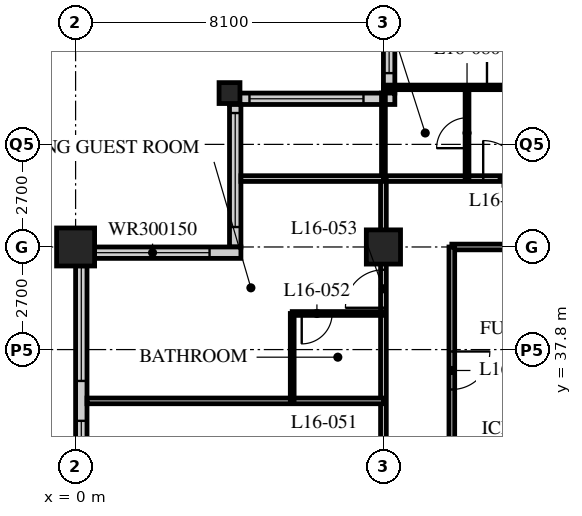
"""IFC4 building model, lengths in metres.
Left out: names, types, materials, properties, quantities, classifications, styles, units other than length and angle.
Written with IfcOpenShell. Run it as: python <this file> out.ifc"""

import sys

from ifc_helpers import new_model, si_unit, direction, frame, frame_2d, origin, origin_2d, place, context, subcontext, project, spatial, rectangle, hollow_rectangle, extrude, element, fill, save


model = new_model("IFC4")
c1 = context("Model", 3, precision=1e-05, world=origin(), true_north=direction((0.0, 1.0)))
c2 = subcontext(c1, "Body", "Model", "MODEL_VIEW")
j1 = project(units=[si_unit("LENGTHUNIT", "METRE"), si_unit("PLANEANGLEUNIT", "RADIAN")], contexts=[c1])
p1 = place(None, origin())
s1 = spatial("IfcSite", under=j1, at=p1, CompositionType="ELEMENT")
p2 = place(p1, origin())
s2 = spatial("IfcBuilding", under=s1, at=p2, CompositionType="ELEMENT")
p3 = place(p2, frame((0.0, 0.0, 67.0)))
s3 = spatial("IfcBuildingStorey", under=s2, at=p3, CompositionType="ELEMENT", Elevation=67.0)
p4 = place(p3, frame((0.0, 40.5, 0.0), z_axis=(0.0, 0.0, 1.0), x_axis=(1.0, 0.0, 0.0)))
e1 = element("IfcColumn", 1, at=p4, inside=s3, PredefinedType="COLUMN", context=c2, shape_type="SweptSolid", body=[
    extrude(hollow_rectangle(XDim=1.0, YDim=1.0, WallThickness=0.1, at=origin_2d()), origin(), (0.0, 0.0, 1.0), 3.4),
])
p5 = place(p3, frame((4.05, 44.55, 0.0), z_axis=(0.0, 0.0, 1.0), x_axis=(1.0, 0.0, 0.0)))
e2 = element("IfcColumn", 2, at=p5, inside=s3, PredefinedType="COLUMN", context=c2, shape_type="SweptSolid", body=[
    extrude(hollow_rectangle(XDim=0.55, YDim=0.55, WallThickness=0.05, at=origin_2d()), origin(), (0.0, 0.0, 1.0), 3.4),
])
p6 = place(p3, frame((8.1, 40.5, 0.0), z_axis=(0.0, 0.0, 1.0), x_axis=(1.0, 0.0, 0.0)))
e3 = element("IfcColumn", 3, at=p6, inside=s3, PredefinedType="COLUMN", context=c2, shape_type="SweptSolid", body=[
    extrude(hollow_rectangle(XDim=0.9, YDim=0.9, WallThickness=0.09, at=origin_2d()), origin(), (0.0, 0.0, 1.0), 3.4),
])
p7 = place(p3, frame((8.25, 48.3, 0.0), z_axis=(0.0, 0.0, 1.0), x_axis=(0.0, -1.0, 0.0)))
e4 = element("IfcWall", 4, at=p7, inside=s3, PredefinedType="SOLIDWALL", context=c2, shape_type="SweptSolid", body=[
    extrude(rectangle(XDim=3.75, YDim=0.3, at=frame_2d((1.875, 0.0))), origin(), (0.0, 0.0, 1.0), 3.19),
])
p8 = place(p7, frame((0.225, 0.0, 0.9)))
e5 = element("IfcOpeningElement", 5, at=p8, cuts=e4, PredefinedType="OPENING", context=c2, shape_type="SweptSolid", body=[
    extrude(rectangle(XDim=3.0, YDim=1.5, at=frame_2d((1.5, 0.75))), frame((0.0, 0.16, 0.0), z_axis=(0.0, -1.0, 0.0), x_axis=(1.0, 0.0, 0.0)), (0.0, 0.0, 1.0), 0.32),
])
p9 = place(p3, frame((8.4, 44.4, 0.0), z_axis=(0.0, 0.0, 1.0), x_axis=(-1.0, 0.0, 0.0)))
e6 = element("IfcWall", 6, at=p9, inside=s3, PredefinedType="SOLIDWALL", context=c2, shape_type="SweptSolid", body=[
    extrude(rectangle(XDim=4.35, YDim=0.3, at=frame_2d((2.175, 0.0))), origin(), (0.0, 0.0, 1.0), 3.19),
])
p10 = place(p9, frame((0.825, 0.0, 0.9)))
e7 = element("IfcOpeningElement", 7, at=p10, cuts=e6, PredefinedType="OPENING", context=c2, shape_type="SweptSolid", body=[
    extrude(rectangle(XDim=3.0, YDim=1.5, at=frame_2d((1.5, 0.75))), frame((0.0, 0.16, 0.0), z_axis=(0.0, -1.0, 0.0), x_axis=(1.0, 0.0, 0.0)), (0.0, 0.0, 1.0), 0.32),
])
p11 = place(p3, frame((4.2, 44.25, 0.0), z_axis=(0.0, 0.0, 1.0), x_axis=(0.0, -1.0, 0.0)))
e8 = element("IfcWall", 8, at=p11, inside=s3, PredefinedType="SOLIDWALL", context=c2, shape_type="SweptSolid", body=[
    extrude(rectangle(XDim=3.75, YDim=0.3, at=frame_2d((1.875, 0.0))), origin(), (0.0, 0.0, 1.0), 3.19),
])
p12 = place(p11, frame((0.225, 0.0, 0.9)))
e9 = element("IfcOpeningElement", 9, at=p12, cuts=e8, PredefinedType="OPENING", context=c2, shape_type="SweptSolid", body=[
    extrude(rectangle(XDim=3.0, YDim=1.5, at=frame_2d((1.5, 0.75))), frame((0.0, 0.16, 0.0), z_axis=(0.0, -1.0, 0.0), x_axis=(1.0, 0.0, 0.0)), (0.0, 0.0, 1.0), 0.32),
])
p13 = place(p3, frame((4.35, 40.35, 0.0), z_axis=(0.0, 0.0, 1.0), x_axis=(-1.0, 0.0, 0.0)))
e10 = element("IfcWall", 10, at=p13, inside=s3, PredefinedType="SOLIDWALL", context=c2, shape_type="SweptSolid", body=[
    extrude(rectangle(XDim=4.35, YDim=0.3, at=frame_2d((2.175, 0.0))), origin(), (0.0, 0.0, 1.0), 3.19),
])
p14 = place(p13, frame((0.825, 0.0, 0.9)))
e11 = element("IfcOpeningElement", 11, at=p14, cuts=e10, PredefinedType="OPENING", context=c2, shape_type="SweptSolid", body=[
    extrude(rectangle(XDim=3.0, YDim=1.5, at=frame_2d((1.5, 0.75))), frame((0.0, 0.16, 0.0), z_axis=(0.0, -1.0, 0.0), x_axis=(1.0, 0.0, 0.0)), (0.0, 0.0, 1.0), 0.32),
])
p15 = place(p3, frame((0.15, 40.2, 0.0), z_axis=(0.0, 0.0, 1.0), x_axis=(0.0, -1.0, 0.0)))
e12 = element("IfcWall", 12, at=p15, inside=s3, PredefinedType="SOLIDWALL", context=c2, shape_type="SweptSolid", body=[
    extrude(rectangle(XDim=32.1, YDim=0.3, at=frame_2d((16.05, 0.0))), origin(), (0.0, 0.0, 1.0), 3.19),
])
p16 = place(p15, frame((0.225, 0.0, 0.9)))
e13 = element("IfcOpeningElement", 13, at=p16, cuts=e12, PredefinedType="OPENING", context=c2, shape_type="SweptSolid", body=[
    extrude(rectangle(XDim=3.0, YDim=2.0, at=frame_2d((1.5, 1.0))), frame((0.0, 0.16, 0.0), z_axis=(0.0, -1.0, 0.0), x_axis=(1.0, 0.0, 0.0)), (0.0, 0.0, 1.0), 0.32),
])
p17 = place(p15, frame((4.275, 0.0, 0.9)))
e14 = element("IfcOpeningElement", 14, at=p17, cuts=e12, PredefinedType="OPENING", context=c2, shape_type="SweptSolid", body=[
    extrude(rectangle(XDim=3.0, YDim=2.0, at=frame_2d((1.5, 1.0))), frame((0.0, 0.16, 0.0), z_axis=(0.0, -1.0, 0.0), x_axis=(1.0, 0.0, 0.0)), (0.0, 0.0, 1.0), 0.32),
])
p18 = place(p15, frame((8.325, 0.0, 0.9)))
e15 = element("IfcOpeningElement", 15, at=p18, cuts=e12, PredefinedType="OPENING", context=c2, shape_type="SweptSolid", body=[
    extrude(rectangle(XDim=3.0, YDim=2.0, at=frame_2d((1.5, 1.0))), frame((0.0, 0.16, 0.0), z_axis=(0.0, -1.0, 0.0), x_axis=(1.0, 0.0, 0.0)), (0.0, 0.0, 1.0), 0.32),
])
p19 = place(p15, frame((12.375, 0.0, 0.9)))
e16 = element("IfcOpeningElement", 16, at=p19, cuts=e12, PredefinedType="OPENING", context=c2, shape_type="SweptSolid", body=[
    extrude(rectangle(XDim=3.0, YDim=2.0, at=frame_2d((1.5, 1.0))), frame((0.0, 0.16, 0.0), z_axis=(0.0, -1.0, 0.0), x_axis=(1.0, 0.0, 0.0)), (0.0, 0.0, 1.0), 0.32),
])
p20 = place(p15, frame((16.425, 0.0, 0.9)))
e17 = element("IfcOpeningElement", 17, at=p20, cuts=e12, PredefinedType="OPENING", context=c2, shape_type="SweptSolid", body=[
    extrude(rectangle(XDim=3.0, YDim=2.0, at=frame_2d((1.5, 1.0))), frame((0.0, 0.16, 0.0), z_axis=(0.0, -1.0, 0.0), x_axis=(1.0, 0.0, 0.0)), (0.0, 0.0, 1.0), 0.32),
])
p21 = place(p15, frame((20.475, 0.0, 0.9)))
e18 = element("IfcOpeningElement", 18, at=p21, cuts=e12, PredefinedType="OPENING", context=c2, shape_type="SweptSolid", body=[
    extrude(rectangle(XDim=3.0, YDim=2.0, at=frame_2d((1.5, 1.0))), frame((0.0, 0.16, 0.0), z_axis=(0.0, -1.0, 0.0), x_axis=(1.0, 0.0, 0.0)), (0.0, 0.0, 1.0), 0.32),
])
p22 = place(p15, frame((24.525, 0.0, 0.9)))
e19 = element("IfcOpeningElement", 19, at=p22, cuts=e12, PredefinedType="OPENING", context=c2, shape_type="SweptSolid", body=[
    extrude(rectangle(XDim=3.0, YDim=2.0, at=frame_2d((1.5, 1.0))), frame((0.0, 0.16, 0.0), z_axis=(0.0, -1.0, 0.0), x_axis=(1.0, 0.0, 0.0)), (0.0, 0.0, 1.0), 0.32),
])
p23 = place(p15, frame((28.575, 0.0, 0.9)))
e20 = element("IfcOpeningElement", 20, at=p23, cuts=e12, PredefinedType="OPENING", context=c2, shape_type="SweptSolid", body=[
    extrude(rectangle(XDim=3.0, YDim=2.0, at=frame_2d((1.5, 1.0))), frame((0.0, 0.16, 0.0), z_axis=(0.0, -1.0, 0.0), x_axis=(1.0, 0.0, 0.0)), (0.0, 0.0, 1.0), 0.32),
])
p24 = place(p3, frame((8.1, 42.3, 0.0), z_axis=(0.0, 0.0, 1.0), x_axis=(1.0, 0.0, 0.0)))
e21 = element("IfcWall", 21, at=p24, inside=s3, PredefinedType="PARTITIONING", context=c2, shape_type="SweptSolid", body=[
    extrude(rectangle(XDim=36.45, YDim=0.15, at=frame_2d((18.225, 0.0))), origin(), (0.0, 0.0, 1.0), 3.19),
])
p25 = place(p24, frame((9.5, 0.0, 0.0)))
e22 = element("IfcOpeningElement", 22, at=p25, cuts=e21, PredefinedType="OPENING", context=c2, shape_type="SweptSolid", body=[
    extrude(rectangle(XDim=1.0, YDim=2.1, at=frame_2d((0.5, 1.05))), frame((0.0, 0.085, 0.0), z_axis=(0.0, -1.0, 0.0), x_axis=(1.0, 0.0, 0.0)), (0.0, 0.0, 1.0), 0.17),
])
p26 = place(p24, frame((14.6, 0.0, 0.0)))
e23 = element("IfcOpeningElement", 23, at=p26, cuts=e21, PredefinedType="OPENING", context=c2, shape_type="SweptSolid", body=[
    extrude(rectangle(XDim=1.0, YDim=2.1, at=frame_2d((0.5, 1.05))), frame((0.0, 0.085, 0.0), z_axis=(0.0, -1.0, 0.0), x_axis=(1.0, 0.0, 0.0)), (0.0, 0.0, 1.0), 0.17),
])
p27 = place(p24, frame((18.65, 0.0, 0.0)))
e24 = element("IfcOpeningElement", 24, at=p27, cuts=e21, PredefinedType="OPENING", context=c2, shape_type="SweptSolid", body=[
    extrude(rectangle(XDim=1.0, YDim=2.1, at=frame_2d((0.5, 1.05))), frame((0.0, 0.085, 0.0), z_axis=(0.0, -1.0, 0.0), x_axis=(1.0, 0.0, 0.0)), (0.0, 0.0, 1.0), 0.17),
])
p28 = place(p24, frame((25.7, 0.0, 0.0)))
e25 = element("IfcOpeningElement", 25, at=p28, cuts=e21, PredefinedType="OPENING", context=c2, shape_type="SweptSolid", body=[
    extrude(rectangle(XDim=1.0, YDim=2.1, at=frame_2d((0.5, 1.05))), frame((0.0, 0.085, 0.0), z_axis=(0.0, -1.0, 0.0), x_axis=(1.0, 0.0, 0.0)), (0.0, 0.0, 1.0), 0.17),
])
p29 = place(p24, frame((30.8, 0.0, 0.0)))
e26 = element("IfcOpeningElement", 26, at=p29, cuts=e21, PredefinedType="OPENING", context=c2, shape_type="SweptSolid", body=[
    extrude(rectangle(XDim=1.0, YDim=2.1, at=frame_2d((0.5, 1.05))), frame((0.0, 0.085, 0.0), z_axis=(0.0, -1.0, 0.0), x_axis=(1.0, 0.0, 0.0)), (0.0, 0.0, 1.0), 0.17),
])
p30 = place(p24, frame((32.825, 0.0, 0.0)))
e27 = element("IfcOpeningElement", 27, at=p30, cuts=e21, PredefinedType="OPENING", context=c2, shape_type="SweptSolid", body=[
    extrude(rectangle(XDim=1.0, YDim=2.1, at=frame_2d((0.5, 1.05))), frame((0.0, 0.085, 0.0), z_axis=(0.0, -1.0, 0.0), x_axis=(1.0, 0.0, 0.0)), (0.0, 0.0, 1.0), 0.17),
])
p31 = place(p24, frame((2.625, 0.0, 0.0)))
e28 = element("IfcOpeningElement", 28, at=p31, cuts=e21, PredefinedType="OPENING", context=c2, shape_type="SweptSolid", body=[
    extrude(rectangle(XDim=1.0, YDim=2.1, at=frame_2d((0.5, 1.05))), frame((0.0, 0.085, 0.0), z_axis=(0.0, -1.0, 0.0), x_axis=(1.0, 0.0, 0.0)), (0.0, 0.0, 1.0), 0.17),
])
p32 = place(p3, frame((8.1, 12.15, 0.0), z_axis=(0.0, 0.0, 1.0), x_axis=(0.0, 1.0, 0.0)))
e29 = element("IfcWall", 29, at=p32, inside=s3, PredefinedType="PARTITIONING", context=c2, shape_type="SweptSolid", body=[
    extrude(rectangle(XDim=30.15, YDim=0.15, at=frame_2d((15.075, 0.0))), origin(), (0.0, 0.0, 1.0), 2.578),
])
p33 = place(p32, frame((0.6, 0.0, 0.0)))
e30 = element("IfcOpeningElement", 30, at=p33, cuts=e29, PredefinedType="OPENING", context=c2, shape_type="SweptSolid", body=[
    extrude(rectangle(XDim=1.0, YDim=2.1, at=frame_2d((0.5, 1.05))), frame((0.0, 0.085, 0.0), z_axis=(0.0, -1.0, 0.0), x_axis=(1.0, 0.0, 0.0)), (0.0, 0.0, 1.0), 0.17),
])
p34 = place(p32, frame((6.8, 0.0, 0.0)))
e31 = element("IfcOpeningElement", 31, at=p34, cuts=e29, PredefinedType="OPENING", context=c2, shape_type="SweptSolid", body=[
    extrude(rectangle(XDim=1.0, YDim=2.1, at=frame_2d((0.5, 1.05))), frame((0.0, 0.085, 0.0), z_axis=(0.0, -1.0, 0.0), x_axis=(1.0, 0.0, 0.0)), (0.0, 0.0, 1.0), 0.17),
])
p35 = place(p32, frame((8.7, 0.0, 0.0)))
e32 = element("IfcOpeningElement", 32, at=p35, cuts=e29, PredefinedType="OPENING", context=c2, shape_type="SweptSolid", body=[
    extrude(rectangle(XDim=1.0, YDim=2.1, at=frame_2d((0.5, 1.05))), frame((0.0, 0.085, 0.0), z_axis=(0.0, -1.0, 0.0), x_axis=(1.0, 0.0, 0.0)), (0.0, 0.0, 1.0), 0.17),
])
p36 = place(p32, frame((14.6, 0.0, 0.0)))
e33 = element("IfcOpeningElement", 33, at=p36, cuts=e29, PredefinedType="OPENING", context=c2, shape_type="SweptSolid", body=[
    extrude(rectangle(XDim=1.0, YDim=2.1, at=frame_2d((0.5, 1.05))), frame((0.0, 0.085, 0.0), z_axis=(0.0, -1.0, 0.0), x_axis=(1.0, 0.0, 0.0)), (0.0, 0.0, 1.0), 0.17),
])
p37 = place(p32, frame((21.65, 0.0, 0.0)))
e34 = element("IfcOpeningElement", 34, at=p37, cuts=e29, PredefinedType="OPENING", context=c2, shape_type="SweptSolid", body=[
    extrude(rectangle(XDim=1.0, YDim=2.1, at=frame_2d((0.5, 1.05))), frame((0.0, 0.085, 0.0), z_axis=(0.0, -1.0, 0.0), x_axis=(1.0, 0.0, 0.0)), (0.0, 0.0, 1.0), 0.17),
])
p38 = place(p32, frame((26.75, 0.0, 0.0)))
e35 = element("IfcOpeningElement", 35, at=p38, cuts=e29, PredefinedType="OPENING", context=c2, shape_type="SweptSolid", body=[
    extrude(rectangle(XDim=1.0, YDim=2.1, at=frame_2d((0.5, 1.05))), frame((0.0, 0.085, 0.0), z_axis=(0.0, -1.0, 0.0), x_axis=(1.0, 0.0, 0.0)), (0.0, 0.0, 1.0), 0.17),
])
p39 = place(p3, frame((16.0, 40.5, 0.0), z_axis=(0.0, 0.0, 1.0), x_axis=(-1.0, 0.0, 0.0)))
e36 = element("IfcWall", 36, at=p39, inside=s3, PredefinedType="PARTITIONING", context=c2, shape_type="SweptSolid", body=[
    extrude(rectangle(XDim=6.1, YDim=0.15, at=frame_2d((3.05, 0.0))), origin(), (0.0, 0.0, 1.0), 2.578),
])
p40 = place(p3, frame((9.9, 40.5, 0.0), z_axis=(0.0, 0.0, 1.0), x_axis=(0.0, -1.0, 0.0)))
e37 = element("IfcWall", 37, at=p40, inside=s3, PredefinedType="PARTITIONING", context=c2, shape_type="SweptSolid", body=[
    extrude(rectangle(XDim=26.55, YDim=0.15, at=frame_2d((13.275, 0.0))), origin(), (0.0, 0.0, 1.0), 3.19),
])
p41 = place(p40, frame((14.271, 0.0, 0.0)))
e38 = element("IfcOpeningElement", 38, at=p41, cuts=e37, PredefinedType="OPENING", context=c2, shape_type="SweptSolid", body=[
    extrude(rectangle(XDim=1.0, YDim=2.1, at=frame_2d((0.5, 1.05))), frame((0.0, 0.085, 0.0), z_axis=(0.0, -1.0, 0.0), x_axis=(1.0, 0.0, 0.0)), (0.0, 0.0, 1.0), 0.17),
])
p42 = place(p40, frame((10.221, 0.0, 0.0)))
e39 = element("IfcOpeningElement", 39, at=p42, cuts=e37, PredefinedType="OPENING", context=c2, shape_type="SweptSolid", body=[
    extrude(rectangle(XDim=1.0, YDim=2.1, at=frame_2d((0.5, 1.05))), frame((0.0, 0.085, 0.0), z_axis=(0.0, -1.0, 0.0), x_axis=(1.0, 0.0, 0.0)), (0.0, 0.0, 1.0), 0.17),
])
p43 = place(p40, frame((6.8, 0.0, 0.0)))
e40 = element("IfcOpeningElement", 40, at=p43, cuts=e37, PredefinedType="OPENING", context=c2, shape_type="SweptSolid", body=[
    extrude(rectangle(XDim=1.0, YDim=2.1, at=frame_2d((0.5, 1.05))), frame((0.0, 0.085, 0.0), z_axis=(0.0, -1.0, 0.0), x_axis=(1.0, 0.0, 0.0)), (0.0, 0.0, 1.0), 0.17),
])
p44 = place(p40, frame((2.75, 0.0, 0.0)))
e41 = element("IfcOpeningElement", 41, at=p44, cuts=e37, PredefinedType="OPENING", context=c2, shape_type="SweptSolid", body=[
    extrude(rectangle(XDim=1.0, YDim=2.1, at=frame_2d((0.5, 1.05))), frame((0.0, 0.085, 0.0), z_axis=(0.0, -1.0, 0.0), x_axis=(1.0, 0.0, 0.0)), (0.0, 0.0, 1.0), 0.17),
])
p45 = place(p3, frame((8.1, 36.45, 0.0), z_axis=(0.0, 0.0, 1.0), x_axis=(-1.0, 0.0, 0.0)))
e42 = element("IfcWall", 42, at=p45, inside=s3, PredefinedType="PARTITIONING", context=c2, shape_type="SweptSolid", body=[
    extrude(rectangle(XDim=7.8, YDim=0.15, at=frame_2d((3.9, 0.0))), origin(), (0.0, 0.0, 1.0), 3.19),
])
p46 = place(p3, frame((5.7, 36.45, 0.0), z_axis=(0.0, 0.0, 1.0), x_axis=(0.0, 1.0, 0.0)))
e43 = element("IfcWall", 43, at=p46, inside=s3, PredefinedType="PARTITIONING", context=c2, shape_type="SweptSolid", body=[
    extrude(rectangle(XDim=2.3, YDim=0.1, at=frame_2d((1.15, 0.0))), origin(), (0.0, 0.0, 1.0), 3.19),
])
p47 = place(p3, frame((8.1, 38.75, 0.0), z_axis=(0.0, 0.0, 1.0), x_axis=(-1.0, 0.0, 0.0)))
e44 = element("IfcWall", 44, at=p47, inside=s3, PredefinedType="PARTITIONING", context=c2, shape_type="SweptSolid", body=[
    extrude(rectangle(XDim=2.4, YDim=0.1, at=frame_2d((1.2, 0.0))), origin(), (0.0, 0.0, 1.0), 3.19),
])
p48 = place(p47, frame((1.35, 0.0, 0.0)))
e45 = element("IfcOpeningElement", 45, at=p48, cuts=e44, PredefinedType="OPENING", context=c2, shape_type="SweptSolid", body=[
    extrude(rectangle(XDim=0.8, YDim=2.1, at=frame_2d((0.4, 1.05))), frame((0.0, 0.06, 0.0), z_axis=(0.0, -1.0, 0.0), x_axis=(1.0, 0.0, 0.0)), (0.0, 0.0, 1.0), 0.12),
])
p49 = place(p3, frame((8.1, 44.7, 0.0), z_axis=(0.0, 0.0, 1.0), x_axis=(1.0, 0.0, 0.0)))
e46 = element("IfcWall", 46, at=p49, inside=s3, PredefinedType="PARTITIONING", context=c2, shape_type="SweptSolid", body=[
    extrude(rectangle(XDim=4.05, YDim=0.12, at=frame_2d((2.025, 0.0))), origin(), (0.0, 0.0, 1.0), 3.19),
])
p50 = place(p49, frame((2.725, 0.0, 0.0)))
e47 = element("IfcOpeningElement", 47, at=p50, cuts=e46, PredefinedType="OPENING", context=c2, shape_type="SweptSolid", body=[
    extrude(rectangle(XDim=0.85, YDim=2.1, at=frame_2d((0.425, 1.05))), frame((0.0, 0.07, 0.0), z_axis=(0.0, -1.0, 0.0), x_axis=(1.0, 0.0, 0.0)), (0.0, 0.0, 1.0), 0.14),
])
p51 = place(p3, frame((10.3, 42.3, 0.0), z_axis=(0.0, 0.0, 1.0), x_axis=(0.0, 1.0, 0.0)))
e48 = element("IfcWall", 48, at=p51, inside=s3, PredefinedType="PARTITIONING", context=c2, shape_type="SweptSolid", body=[
    extrude(rectangle(XDim=2.4, YDim=0.1, at=frame_2d((1.2, 0.0))), origin(), (0.0, 0.0, 1.0), 3.19),
])
p52 = place(p51, frame((0.8, 0.0, 0.0)))
e49 = element("IfcOpeningElement", 49, at=p52, cuts=e48, PredefinedType="OPENING", context=c2, shape_type="SweptSolid", body=[
    extrude(rectangle(XDim=0.8, YDim=2.1, at=frame_2d((0.4, 1.05))), frame((0.0, 0.06, 0.0), z_axis=(0.0, -1.0, 0.0), x_axis=(1.0, 0.0, 0.0)), (0.0, 0.0, 1.0), 0.12),
])
p53 = place(p3, frame((8.1, 42.3, 0.0), z_axis=(0.0, 0.0, 1.0), x_axis=(0.0, 1.0, 0.0)))
e50 = element("IfcWall", 50, at=p53, inside=s3, PredefinedType="PARTITIONING", context=c2, shape_type="SweptSolid", body=[
    extrude(rectangle(XDim=2.25, YDim=0.1, at=frame_2d((1.125, 0.0))), origin(), (0.0, 0.0, 1.0), 2.578),
])
p54 = place(p3, frame((4.35, 42.3, 0.0), z_axis=(0.0, 0.0, 1.0), x_axis=(1.0, 0.0, 0.0)))
e51 = element("IfcWall", 51, at=p54, inside=s3, PredefinedType="PARTITIONING", context=c2, shape_type="SweptSolid", body=[
    extrude(rectangle(XDim=3.75, YDim=0.15, at=frame_2d((1.875, 0.0))), origin(), (0.0, 0.0, 1.0), 3.19),
])
p55 = place(p8, origin())
e52 = element("IfcWindow", 52, at=p55, inside=s3, PartitioningType="SINGLE_PANEL", PredefinedType="WINDOW", context=c2, shape_type="SweptSolid", body=[
    extrude(rectangle(XDim=3.0, YDim=1.5, at=frame_2d((1.5, 0.75))), frame((0.0, 0.03, 0.0), z_axis=(0.0, -1.0, 0.0), x_axis=(1.0, 0.0, 0.0)), (0.0, 0.0, 1.0), 0.06),
])
fill(e5, e52)
p56 = place(p10, origin())
e53 = element("IfcWindow", 53, at=p56, inside=s3, PartitioningType="SINGLE_PANEL", PredefinedType="WINDOW", context=c2, shape_type="SweptSolid", body=[
    extrude(rectangle(XDim=3.0, YDim=1.5, at=frame_2d((1.5, 0.75))), frame((0.0, 0.03, 0.0), z_axis=(0.0, -1.0, 0.0), x_axis=(1.0, 0.0, 0.0)), (0.0, 0.0, 1.0), 0.06),
])
fill(e7, e53)
p57 = place(p12, origin())
e54 = element("IfcWindow", 54, at=p57, inside=s3, PartitioningType="SINGLE_PANEL", PredefinedType="WINDOW", context=c2, shape_type="SweptSolid", body=[
    extrude(rectangle(XDim=3.0, YDim=1.5, at=frame_2d((1.5, 0.75))), frame((0.0, 0.03, 0.0), z_axis=(0.0, -1.0, 0.0), x_axis=(1.0, 0.0, 0.0)), (0.0, 0.0, 1.0), 0.06),
])
fill(e9, e54)
p58 = place(p14, origin())
e55 = element("IfcWindow", 55, at=p58, inside=s3, PartitioningType="SINGLE_PANEL", PredefinedType="WINDOW", context=c2, shape_type="SweptSolid", body=[
    extrude(rectangle(XDim=3.0, YDim=1.5, at=frame_2d((1.5, 0.75))), frame((0.0, 0.03, 0.0), z_axis=(0.0, -1.0, 0.0), x_axis=(1.0, 0.0, 0.0)), (0.0, 0.0, 1.0), 0.06),
])
fill(e11, e55)
p59 = place(p16, origin())
e56 = element("IfcWindow", 56, at=p59, inside=s3, PartitioningType="SINGLE_PANEL", PredefinedType="WINDOW", context=c2, shape_type="SweptSolid", body=[
    extrude(rectangle(XDim=3.0, YDim=2.0, at=frame_2d((1.5, 1.0))), frame((0.0, 0.03, 0.0), z_axis=(0.0, -1.0, 0.0), x_axis=(1.0, 0.0, 0.0)), (0.0, 0.0, 1.0), 0.06),
])
fill(e13, e56)
p60 = place(p17, origin())
e57 = element("IfcWindow", 57, at=p60, inside=s3, PartitioningType="SINGLE_PANEL", PredefinedType="WINDOW", context=c2, shape_type="SweptSolid", body=[
    extrude(rectangle(XDim=3.0, YDim=2.0, at=frame_2d((1.5, 1.0))), frame((0.0, 0.03, 0.0), z_axis=(0.0, -1.0, 0.0), x_axis=(1.0, 0.0, 0.0)), (0.0, 0.0, 1.0), 0.06),
])
fill(e14, e57)
p61 = place(p44, origin())
e58 = element("IfcDoor", 58, at=p61, inside=s3, OperationType="SINGLE_SWING_LEFT", PredefinedType="DOOR", context=c2, shape_type="SweptSolid", body=[
    extrude(rectangle(XDim=1.0, YDim=2.1, at=frame_2d((0.5, 1.05))), frame((0.0, 0.025, 0.0), z_axis=(0.0, -1.0, 0.0), x_axis=(1.0, 0.0, 0.0)), (0.0, 0.0, 1.0), 0.05),
])
fill(e41, e58)
p62 = place(p48, origin())
e59 = element("IfcDoor", 59, at=p62, inside=s3, OperationType="SINGLE_SWING_RIGHT", PredefinedType="DOOR", context=c2, shape_type="SweptSolid", body=[
    extrude(rectangle(XDim=0.8, YDim=2.1, at=frame_2d((0.4, 1.05))), frame((0.0, 0.025, 0.0), z_axis=(0.0, -1.0, 0.0), x_axis=(1.0, 0.0, 0.0)), (0.0, 0.0, 1.0), 0.05),
])
fill(e45, e59)
p63 = place(p38, origin())
e60 = element("IfcDoor", 60, at=p63, inside=s3, OperationType="SINGLE_SWING_LEFT", PredefinedType="DOOR", context=c2, shape_type="SweptSolid", body=[
    extrude(rectangle(XDim=1.0, YDim=2.1, at=frame_2d((0.5, 1.05))), frame((0.0, 0.025, 0.0), z_axis=(0.0, -1.0, 0.0), x_axis=(1.0, 0.0, 0.0)), (0.0, 0.0, 1.0), 0.05),
])
fill(e35, e60)
p64 = place(p52, origin())
e61 = element("IfcDoor", 61, at=p64, inside=s3, OperationType="SINGLE_SWING_LEFT", PredefinedType="DOOR", context=c2, shape_type="SweptSolid", body=[
    extrude(rectangle(XDim=0.8, YDim=2.1, at=frame_2d((0.4, 1.05))), frame((0.0, 0.025, 0.0), z_axis=(0.0, -1.0, 0.0), x_axis=(1.0, 0.0, 0.0)), (0.0, 0.0, 1.0), 0.05),
])
fill(e49, e61)
p65 = place(p31, origin())
e62 = element("IfcDoor", 62, at=p65, inside=s3, OperationType="SINGLE_SWING_LEFT", PredefinedType="DOOR", context=c2, shape_type="SweptSolid", body=[
    extrude(rectangle(XDim=1.0, YDim=2.1, at=frame_2d((0.5, 1.05))), frame((0.0, 0.025, 0.0), z_axis=(0.0, -1.0, 0.0), x_axis=(1.0, 0.0, 0.0)), (0.0, 0.0, 1.0), 0.05),
])
fill(e28, e62)
p66 = place(p50, origin())
e63 = element("IfcDoor", 63, at=p66, inside=s3, OperationType="SINGLE_SWING_LEFT", PredefinedType="DOOR", context=c2, shape_type="SweptSolid", body=[
    extrude(rectangle(XDim=0.85, YDim=2.1, at=frame_2d((0.425, 1.05))), frame((0.0, 0.025, 0.0), z_axis=(0.0, -1.0, 0.0), x_axis=(1.0, 0.0, 0.0)), (0.0, 0.0, 1.0), 0.05),
])
fill(e47, e63)
save(model, sys.argv[1])
